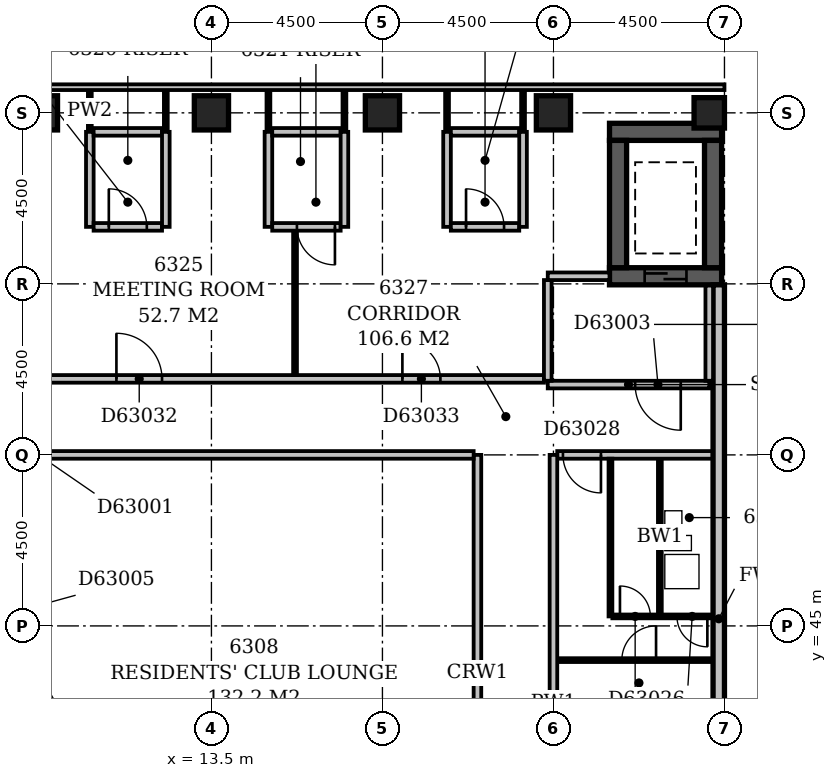
"""IFC4 building model, lengths in metres.
Left out: names, types, materials, properties, quantities, classifications, styles, units other than length and angle.
Written with IfcOpenShell. Run it as: python <this file> out.ifc"""

import sys

from ifc_helpers import new_model, si_unit, direction, frame, frame_2d, origin, origin_2d, place, context, subcontext, project, spatial, rectangle, extrude, element, fill, save


model = new_model("IFC4")
c1 = context("Model", 3, precision=1e-05, world=origin(), true_north=direction((0.0, 1.0)))
c2 = subcontext(c1, "Body", "Model", "MODEL_VIEW")
j1 = project(units=[si_unit("LENGTHUNIT", "METRE"), si_unit("PLANEANGLEUNIT", "RADIAN")], contexts=[c1])
p1 = place(None, origin())
s1 = spatial("IfcSite", under=j1, at=p1, CompositionType="ELEMENT")
p2 = place(p1, origin())
s2 = spatial("IfcBuilding", under=s1, at=p2, CompositionType="ELEMENT")
p3 = place(p2, frame((0.0, 0.0, 243.8)))
s3 = spatial("IfcBuildingStorey", under=s2, at=p3, CompositionType="ELEMENT", Elevation=243.8)
p4 = place(p3, frame((23.975, 54.2, -0.3), z_axis=(0.0, 0.0, 1.0), x_axis=(1.0, 0.0, 0.0)))
e1 = element("IfcWall", 1, at=p4, inside=s3, PredefinedType="SHEAR", context=c2, shape_type="SweptSolid", body=[
    extrude(rectangle(XDim=2.95, YDim=0.45, at=frame_2d((1.475, 0.0))), origin(), (0.0, 0.0, 1.0), 3.6),
])
p5 = place(p4, frame((0.925, 0.0, 0.3)))
e2 = element("IfcOpeningElement", 2, at=p5, cuts=e1, PredefinedType="OPENING", context=c2, shape_type="SweptSolid", body=[
    extrude(rectangle(XDim=1.1, YDim=2.1, at=frame_2d((0.55, 1.05))), frame((0.0, 0.237, 0.0), z_axis=(0.0, -1.0, 0.0), x_axis=(1.0, 0.0, 0.0)), (0.0, 0.0, 1.0), 0.474),
])
p6 = place(p3, frame((23.975, 58.0, -0.3), z_axis=(0.0, 0.0, 1.0), x_axis=(1.0, 0.0, 0.0)))
e3 = element("IfcWall", 3, at=p6, inside=s3, PredefinedType="SHEAR", context=c2, shape_type="SweptSolid", body=[
    extrude(rectangle(XDim=2.95, YDim=0.45, at=frame_2d((1.475, 0.0))), origin(), (0.0, 0.0, 1.0), 3.6),
])
for number, where, z_axis, x_axis in (
    (4, (24.2, 54.425, -0.3), (0.0, 0.0, 1.0), (0.0, 1.0, 0.0)),
    (5, (26.7, 54.425, -0.3), (0.0, 0.0, 1.0), (0.0, 1.0, 0.0)),
):
    element("IfcWall", number, at=place(p3, frame(where, z_axis=z_axis, x_axis=x_axis)), inside=s3, PredefinedType="SHEAR", context=c2, shape_type="SweptSolid", body=[
        extrude(rectangle(XDim=3.35, YDim=0.45, at=frame_2d((1.675, 0.0))), origin(), (0.0, 0.0, 1.0), 3.6),
    ])
for number, where, z_axis, x_axis in (
    (6, (9.0, 58.5, -0.3), (0.0, 0.0, 1.0), (1.0, 0.0, 0.0)),
    (7, (13.5, 58.5, -0.3), (0.0, 0.0, 1.0), (1.0, 0.0, 0.0)),
    (8, (18.0, 58.5, -0.3), (0.0, 0.0, 1.0), (1.0, 0.0, 0.0)),
    (9, (22.5, 58.5, -0.3), (0.0, 0.0, 1.0), (1.0, 0.0, 0.0)),
):
    element("IfcColumn", number, at=place(p3, frame(where, z_axis=z_axis, x_axis=x_axis)), inside=s3, PredefinedType="COLUMN", context=c2, shape_type="SweptSolid", body=[
        extrude(rectangle(XDim=0.9, YDim=0.9, at=origin_2d()), origin(), (0.0, 0.0, 1.0), 3.6),
    ])
p7 = place(p3, frame((26.6, 58.5, -0.3), z_axis=(0.0, 0.0, 1.0), x_axis=(1.0, 0.0, 0.0)))
e10 = element("IfcColumn", 10, at=p7, inside=s3, PredefinedType="COLUMN", context=c2, shape_type="SweptSolid", body=[
    extrude(rectangle(XDim=0.8, YDim=0.8, at=origin_2d()), origin(), (0.0, 0.0, 1.0), 3.6),
])
p8 = place(p3, frame((27.0, 59.175, 0.0), z_axis=(0.0, 0.0, 1.0), x_axis=(-1.0, 0.0, 0.0)))
e11 = element("IfcWall", 11, at=p8, inside=s3, PredefinedType="STANDARD", context=c2, shape_type="SweptSolid", body=[
    extrude(rectangle(XDim=27.75, YDim=0.15, at=frame_2d((13.875, 0.0))), origin(), (0.0, 0.0, 1.0), 2.7),
])
p9 = place(p3, frame((26.85, 36.4, 0.0), z_axis=(0.0, 0.0, 1.0), x_axis=(0.0, 1.0, 0.0)))
e12 = element("IfcWall", 12, at=p9, inside=s3, PredefinedType="STANDARD", context=c2, shape_type="SweptSolid", body=[
    extrude(rectangle(XDim=17.575, YDim=0.3, at=frame_2d((8.788, 0.0))), origin(), (0.0, 0.0, 1.0), 3.3),
])
p10 = place(p3, frame((22.35, 51.35, 0.0), z_axis=(0.0, 0.0, 1.0), x_axis=(1.0, 0.0, 0.0)))
e13 = element("IfcWall", 13, at=p10, inside=s3, PredefinedType="PARTITIONING", context=c2, shape_type="SweptSolid", body=[
    extrude(rectangle(XDim=4.25, YDim=0.2, at=frame_2d((2.125, 0.0))), origin(), (0.0, 0.0, 1.0), 3.3),
])
p11 = place(p10, frame((2.3, 0.0, 0.0)))
e14 = element("IfcOpeningElement", 14, at=p11, cuts=e13, PredefinedType="OPENING", context=c2, shape_type="SweptSolid", body=[
    extrude(rectangle(XDim=1.2, YDim=2.1, at=frame_2d((0.6, 1.05))), frame((0.0, 0.112, 0.0), z_axis=(0.0, -1.0, 0.0), x_axis=(1.0, 0.0, 0.0)), (0.0, 0.0, 1.0), 0.224),
])
p12 = place(p3, frame((26.6, 51.45, 0.0), z_axis=(0.0, 0.0, 1.0), x_axis=(0.0, 1.0, 0.0)))
e15 = element("IfcWall", 15, at=p12, inside=s3, PredefinedType="PARTITIONING", context=c2, shape_type="SweptSolid", body=[
    extrude(rectangle(XDim=2.505, YDim=0.2, at=frame_2d((1.252, 0.0))), origin(), (0.0, 0.0, 1.0), 3.3),
])
p13 = place(p3, frame((22.35, 54.2, 0.0), z_axis=(0.0, 0.0, 1.0), x_axis=(1.0, 0.0, 0.0)))
e16 = element("IfcWall", 16, at=p13, inside=s3, PredefinedType="PARTITIONING", context=c2, shape_type="SweptSolid", body=[
    extrude(rectangle(XDim=1.625, YDim=0.2, at=frame_2d((0.812, 0.0))), origin(), (0.0, 0.0, 1.0), 3.3),
])
p14 = place(p3, frame((22.35, 51.45, 0.0), z_axis=(0.0, 0.0, 1.0), x_axis=(0.0, 1.0, 0.0)))
e17 = element("IfcWall", 17, at=p14, inside=s3, PredefinedType="PARTITIONING", context=c2, shape_type="SweptSolid", body=[
    extrude(rectangle(XDim=2.65, YDim=0.2, at=frame_2d((1.325, 0.0))), origin(), (0.0, 0.0, 1.0), 3.3),
])
p15 = place(p3, frame((22.5, 36.45, 0.0), z_axis=(0.0, 0.0, 1.0), x_axis=(0.0, 1.0, 0.0)))
e18 = element("IfcWall", 18, at=p15, inside=s3, PredefinedType="PARTITIONING", context=c2, shape_type="SweptSolid", body=[
    extrude(rectangle(XDim=13.05, YDim=0.2, at=frame_2d((6.525, 0.0))), origin(), (0.0, 0.0, 1.0), 3.3),
])
p16 = place(p3, frame((20.5, 38.0, 0.0), z_axis=(0.0, 0.0, 1.0), x_axis=(0.0, 1.0, 0.0)))
e19 = element("IfcWall", 19, at=p16, inside=s3, PredefinedType="PARTITIONING", context=c2, shape_type="SweptSolid", body=[
    extrude(rectangle(XDim=11.5, YDim=0.2, at=frame_2d((5.75, 0.0))), origin(), (0.0, 0.0, 1.0), 3.3),
])
p17 = place(p3, frame((22.6, 44.1, 0.0), z_axis=(0.0, 0.0, 1.0), x_axis=(1.0, 0.0, 0.0)))
e20 = element("IfcWall", 20, at=p17, inside=s3, PredefinedType="PARTITIONING", context=c2, shape_type="SweptSolid", body=[
    extrude(rectangle(XDim=4.4, YDim=0.1, at=frame_2d((2.2, 0.0))), origin(), (0.0, 0.0, 1.0), 3.3),
])
p18 = place(p17, frame((1.7, 0.0, 0.0)))
e21 = element("IfcOpeningElement", 21, at=p18, cuts=e20, PredefinedType="OPENING", context=c2, shape_type="SweptSolid", body=[
    extrude(rectangle(XDim=0.9, YDim=2.1, at=frame_2d((0.45, 1.05))), frame((0.0, 0.062, 0.0), z_axis=(0.0, -1.0, 0.0), x_axis=(1.0, 0.0, 0.0)), (0.0, 0.0, 1.0), 0.124),
])
p19 = place(p3, frame((24.0, 45.25, 0.0), z_axis=(0.0, 0.0, 1.0), x_axis=(0.0, 1.0, 0.0)))
e22 = element("IfcWall", 22, at=p19, inside=s3, PredefinedType="PARTITIONING", context=c2, shape_type="SweptSolid", body=[
    extrude(rectangle(XDim=4.15, YDim=0.1, at=frame_2d((2.075, 0.0))), origin(), (0.0, 0.0, 1.0), 3.3),
])
p20 = place(p3, frame((24.05, 45.25, 0.0), z_axis=(0.0, 0.0, 1.0), x_axis=(1.0, 0.0, 0.0)))
e23 = element("IfcWall", 23, at=p20, inside=s3, PredefinedType="PARTITIONING", context=c2, shape_type="SweptSolid", body=[
    extrude(rectangle(XDim=2.95, YDim=0.1, at=frame_2d((1.475, 0.0))), origin(), (0.0, 0.0, 1.0), 3.3),
])
p21 = place(p20, frame((1.7, 0.0, 0.0)))
e24 = element("IfcOpeningElement", 24, at=p21, cuts=e23, PredefinedType="OPENING", context=c2, shape_type="SweptSolid", body=[
    extrude(rectangle(XDim=0.8, YDim=2.1, at=frame_2d((0.4, 1.05))), frame((0.0, 0.062, 0.0), z_axis=(0.0, -1.0, 0.0), x_axis=(1.0, 0.0, 0.0)), (0.0, 0.0, 1.0), 0.124),
])
p22 = place(p20, frame((0.2, 0.0, 0.0)))
e25 = element("IfcOpeningElement", 25, at=p22, cuts=e23, PredefinedType="OPENING", context=c2, shape_type="SweptSolid", body=[
    extrude(rectangle(XDim=0.8, YDim=2.1, at=frame_2d((0.4, 1.05))), frame((0.0, 0.062, 0.0), z_axis=(0.0, -1.0, 0.0), x_axis=(1.0, 0.0, 0.0)), (0.0, 0.0, 1.0), 0.124),
])
p23 = place(p3, frame((25.3, 45.3, 0.0), z_axis=(0.0, 0.0, 1.0), x_axis=(0.0, 1.0, 0.0)))
e26 = element("IfcWall", 26, at=p23, inside=s3, PredefinedType="PLUMBINGWALL", context=c2, shape_type="SweptSolid", body=[
    extrude(rectangle(XDim=4.1, YDim=0.1, at=frame_2d((2.05, 0.0))), origin(), (0.0, 0.0, 1.0), 3.3),
])
p24 = place(p3, frame((9.1, 49.5, 0.0), z_axis=(0.0, 0.0, 1.0), x_axis=(1.0, 0.0, 0.0)))
e27 = element("IfcWall", 27, at=p24, inside=s3, PredefinedType="PARTITIONING", context=c2, shape_type="SweptSolid", body=[
    extrude(rectangle(XDim=11.3, YDim=0.2, at=frame_2d((5.65, 0.0))), origin(), (0.0, 0.0, 1.0), 3.3),
])
p25 = place(p3, frame((22.6, 49.5, 0.0), z_axis=(0.0, 0.0, 1.0), x_axis=(1.0, 0.0, 0.0)))
e28 = element("IfcWall", 28, at=p25, inside=s3, PredefinedType="PARTITIONING", context=c2, shape_type="SweptSolid", body=[
    extrude(rectangle(XDim=4.4, YDim=0.2, at=frame_2d((2.2, 0.0))), origin(), (0.0, 0.0, 1.0), 3.3),
])
p26 = place(p25, frame((0.15, 0.0, 0.0)))
e29 = element("IfcOpeningElement", 29, at=p26, cuts=e28, PredefinedType="OPENING", context=c2, shape_type="SweptSolid", body=[
    extrude(rectangle(XDim=1.0, YDim=2.1, at=frame_2d((0.5, 1.05))), frame((0.0, 0.112, 0.0), z_axis=(0.0, -1.0, 0.0), x_axis=(1.0, 0.0, 0.0)), (0.0, 0.0, 1.0), 0.224),
])
p27 = place(p3, frame((7.6, 51.5, 0.0), z_axis=(0.0, 0.0, 1.0), x_axis=(1.0, 0.0, 0.0)))
e30 = element("IfcWall", 30, at=p27, inside=s3, PredefinedType="PARTITIONING", context=c2, shape_type="SweptSolid", body=[
    extrude(rectangle(XDim=14.65, YDim=0.2, at=frame_2d((7.325, 0.0))), origin(), (0.0, 0.0, 1.0), 3.3),
])
p28 = place(p27, frame((3.4, 0.0, 0.0)))
e31 = element("IfcOpeningElement", 31, at=p28, cuts=e30, PredefinedType="OPENING", context=c2, shape_type="SweptSolid", body=[
    extrude(rectangle(XDim=1.2, YDim=2.1, at=frame_2d((0.6, 1.05))), frame((0.0, 0.112, 0.0), z_axis=(0.0, -1.0, 0.0), x_axis=(1.0, 0.0, 0.0)), (0.0, 0.0, 1.0), 0.224),
])
p29 = place(p27, frame((10.925, 0.0, 0.0)))
e32 = element("IfcOpeningElement", 32, at=p29, cuts=e30, PredefinedType="OPENING", context=c2, shape_type="SweptSolid", body=[
    extrude(rectangle(XDim=1.0, YDim=2.1, at=frame_2d((0.5, 1.05))), frame((0.0, 0.112, 0.0), z_axis=(0.0, -1.0, 0.0), x_axis=(1.0, 0.0, 0.0)), (0.0, 0.0, 1.0), 0.224),
])
p30 = place(p3, frame((15.7, 51.6, 0.0), z_axis=(0.0, 0.0, 1.0), x_axis=(0.0, 1.0, 0.0)))
e33 = element("IfcWall", 33, at=p30, inside=s3, PredefinedType="PARTITIONING", context=c2, shape_type="SweptSolid", body=[
    extrude(rectangle(XDim=3.8, YDim=0.1, at=frame_2d((1.9, 0.0))), origin(), (0.0, 0.0, 1.0), 3.3),
])
p31 = place(p3, frame((10.3, 55.5, 0.0), z_axis=(0.0, 0.0, 1.0), x_axis=(0.0, 1.0, 0.0)))
e34 = element("IfcWall", 34, at=p31, inside=s3, PredefinedType="PARTITIONING", context=c2, shape_type="SweptSolid", body=[
    extrude(rectangle(XDim=2.5, YDim=0.2, at=frame_2d((1.25, 0.0))), origin(), (0.0, 0.0, 1.0), 3.3),
])
p32 = place(p3, frame((10.4, 55.5, 0.0), z_axis=(0.0, 0.0, 1.0), x_axis=(1.0, 0.0, 0.0)))
e35 = element("IfcWall", 35, at=p32, inside=s3, PredefinedType="PARTITIONING", context=c2, shape_type="SweptSolid", body=[
    extrude(rectangle(XDim=1.8, YDim=0.2, at=frame_2d((0.9, 0.0))), origin(), (0.0, 0.0, 1.0), 3.3),
])
p33 = place(p32, frame((0.4, 0.0, 0.0)))
e36 = element("IfcOpeningElement", 36, at=p33, cuts=e35, PredefinedType="OPENING", context=c2, shape_type="SweptSolid", body=[
    extrude(rectangle(XDim=1.0, YDim=2.1, at=frame_2d((0.5, 1.05))), frame((0.0, 0.112, 0.0), z_axis=(0.0, -1.0, 0.0), x_axis=(1.0, 0.0, 0.0)), (0.0, 0.0, 1.0), 0.224),
])
for number, where, z_axis, x_axis in (
    (37, (12.3, 55.5, 0.0), (0.0, 0.0, 1.0), (0.0, 1.0, 0.0)),
    (38, (15.0, 55.5, 0.0), (0.0, 0.0, 1.0), (0.0, 1.0, 0.0)),
):
    element("IfcWall", number, at=place(p3, frame(where, z_axis=z_axis, x_axis=x_axis)), inside=s3, PredefinedType="PARTITIONING", context=c2, shape_type="SweptSolid", body=[
        extrude(rectangle(XDim=2.5, YDim=0.2, at=frame_2d((1.25, 0.0))), origin(), (0.0, 0.0, 1.0), 3.3),
    ])
p34 = place(p3, frame((15.1, 55.5, 0.0), z_axis=(0.0, 0.0, 1.0), x_axis=(1.0, 0.0, 0.0)))
e39 = element("IfcWall", 39, at=p34, inside=s3, PredefinedType="PARTITIONING", context=c2, shape_type="SweptSolid", body=[
    extrude(rectangle(XDim=1.8, YDim=0.2, at=frame_2d((0.9, 0.0))), origin(), (0.0, 0.0, 1.0), 3.3),
])
p35 = place(p34, frame((0.65, 0.0, 0.0)))
e40 = element("IfcOpeningElement", 40, at=p35, cuts=e39, PredefinedType="OPENING", context=c2, shape_type="SweptSolid", body=[
    extrude(rectangle(XDim=1.0, YDim=2.1, at=frame_2d((0.5, 1.05))), frame((0.0, 0.112, 0.0), z_axis=(0.0, -1.0, 0.0), x_axis=(1.0, 0.0, 0.0)), (0.0, 0.0, 1.0), 0.224),
])
for number, where, z_axis, x_axis in (
    (41, (17.0, 55.5, 0.0), (0.0, 0.0, 1.0), (0.0, 1.0, 0.0)),
    (42, (19.7, 55.5, 0.0), (0.0, 0.0, 1.0), (0.0, 1.0, 0.0)),
):
    element("IfcWall", number, at=place(p3, frame(where, z_axis=z_axis, x_axis=x_axis)), inside=s3, PredefinedType="PARTITIONING", context=c2, shape_type="SweptSolid", body=[
        extrude(rectangle(XDim=2.5, YDim=0.2, at=frame_2d((1.25, 0.0))), origin(), (0.0, 0.0, 1.0), 3.3),
    ])
p36 = place(p3, frame((19.8, 55.5, 0.0), z_axis=(0.0, 0.0, 1.0), x_axis=(1.0, 0.0, 0.0)))
e43 = element("IfcWall", 43, at=p36, inside=s3, PredefinedType="PARTITIONING", context=c2, shape_type="SweptSolid", body=[
    extrude(rectangle(XDim=1.8, YDim=0.2, at=frame_2d((0.9, 0.0))), origin(), (0.0, 0.0, 1.0), 3.3),
])
p37 = place(p36, frame((0.4, 0.0, 0.0)))
e44 = element("IfcOpeningElement", 44, at=p37, cuts=e43, PredefinedType="OPENING", context=c2, shape_type="SweptSolid", body=[
    extrude(rectangle(XDim=1.0, YDim=2.1, at=frame_2d((0.5, 1.05))), frame((0.0, 0.112, 0.0), z_axis=(0.0, -1.0, 0.0), x_axis=(1.0, 0.0, 0.0)), (0.0, 0.0, 1.0), 0.224),
])
p38 = place(p3, frame((21.7, 55.5, 0.0), z_axis=(0.0, 0.0, 1.0), x_axis=(0.0, 1.0, 0.0)))
e45 = element("IfcWall", 45, at=p38, inside=s3, PredefinedType="PARTITIONING", context=c2, shape_type="SweptSolid", body=[
    extrude(rectangle(XDim=2.5, YDim=0.2, at=frame_2d((1.25, 0.0))), origin(), (0.0, 0.0, 1.0), 3.3),
])
p39 = place(p3, frame((10.3, 58.0, 0.0), z_axis=(0.0, 0.0, 1.0), x_axis=(0.0, 1.0, 0.0)))
e46 = element("IfcWall", 46, at=p39, inside=s3, PredefinedType="PARTITIONING", context=c2, shape_type="SweptSolid", body=[
    extrude(rectangle(XDim=1.1, YDim=0.1, at=frame_2d((0.55, 0.0))), origin(), (0.0, 0.0, 1.0), 3.3),
])
p40 = place(p3, frame((10.4, 58.0, 0.0), z_axis=(0.0, 0.0, 1.0), x_axis=(1.0, 0.0, 0.0)))
e47 = element("IfcWall", 47, at=p40, inside=s3, PredefinedType="PARTITIONING", context=c2, shape_type="SweptSolid", body=[
    extrude(rectangle(XDim=1.8, YDim=0.2, at=frame_2d((0.9, 0.0))), origin(), (0.0, 0.0, 1.0), 3.3),
])
for number, where, z_axis, x_axis in (
    (48, (12.3, 58.0, 0.0), (0.0, 0.0, 1.0), (0.0, 1.0, 0.0)),
    (49, (15.0, 58.0, 0.0), (0.0, 0.0, 1.0), (0.0, 1.0, 0.0)),
):
    element("IfcWall", number, at=place(p3, frame(where, z_axis=z_axis, x_axis=x_axis)), inside=s3, PredefinedType="PARTITIONING", context=c2, shape_type="SweptSolid", body=[
        extrude(rectangle(XDim=1.1, YDim=0.1, at=frame_2d((0.55, 0.0))), origin(), (0.0, 0.0, 1.0), 3.3),
    ])
p41 = place(p3, frame((15.1, 58.0, 0.0), z_axis=(0.0, 0.0, 1.0), x_axis=(1.0, 0.0, 0.0)))
e50 = element("IfcWall", 50, at=p41, inside=s3, PredefinedType="PARTITIONING", context=c2, shape_type="SweptSolid", body=[
    extrude(rectangle(XDim=1.8, YDim=0.2, at=frame_2d((0.9, 0.0))), origin(), (0.0, 0.0, 1.0), 3.3),
])
for number, where, z_axis, x_axis in (
    (51, (17.0, 58.0, 0.0), (0.0, 0.0, 1.0), (0.0, 1.0, 0.0)),
    (52, (19.7, 58.0, 0.0), (0.0, 0.0, 1.0), (0.0, 1.0, 0.0)),
):
    element("IfcWall", number, at=place(p3, frame(where, z_axis=z_axis, x_axis=x_axis)), inside=s3, PredefinedType="PARTITIONING", context=c2, shape_type="SweptSolid", body=[
        extrude(rectangle(XDim=1.1, YDim=0.1, at=frame_2d((0.55, 0.0))), origin(), (0.0, 0.0, 1.0), 3.3),
    ])
p42 = place(p3, frame((19.8, 58.0, 0.0), z_axis=(0.0, 0.0, 1.0), x_axis=(1.0, 0.0, 0.0)))
e53 = element("IfcWall", 53, at=p42, inside=s3, PredefinedType="PARTITIONING", context=c2, shape_type="SweptSolid", body=[
    extrude(rectangle(XDim=1.8, YDim=0.2, at=frame_2d((0.9, 0.0))), origin(), (0.0, 0.0, 1.0), 3.3),
])
p43 = place(p3, frame((21.7, 58.0, 0.0), z_axis=(0.0, 0.0, 1.0), x_axis=(0.0, 1.0, 0.0)))
e54 = element("IfcWall", 54, at=p43, inside=s3, PredefinedType="PARTITIONING", context=c2, shape_type="SweptSolid", body=[
    extrude(rectangle(XDim=1.1, YDim=0.1, at=frame_2d((0.55, 0.0))), origin(), (0.0, 0.0, 1.0), 3.3),
])
p44 = place(p11, origin())
e55 = element("IfcDoor", 55, at=p44, inside=s3, OperationType="SINGLE_SWING_RIGHT", PredefinedType="DOOR", context=c2, shape_type="SweptSolid", body=[
    extrude(rectangle(XDim=1.2, YDim=2.1, at=frame_2d((0.6, 1.05))), frame((0.0, 0.025, 0.0), z_axis=(0.0, -1.0, 0.0), x_axis=(1.0, 0.0, 0.0)), (0.0, 0.0, 1.0), 0.05),
])
fill(e14, e55)
p45 = place(p5, origin())
e56 = element("IfcDoor", 56, at=p45, inside=s3, OperationType="SLIDING_TO_LEFT", PredefinedType="DOOR", context=c2, shape_type="SweptSolid", body=[
    extrude(rectangle(XDim=1.1, YDim=2.1, at=frame_2d((0.55, 1.05))), frame((0.0, 0.025, 0.0), z_axis=(0.0, -1.0, 0.0), x_axis=(1.0, 0.0, 0.0)), (0.0, 0.0, 1.0), 0.05),
])
fill(e2, e56)
p46 = place(p18, frame((0.9, 0.0, 0.0), z_axis=(0.0, 0.0, 1.0), x_axis=(-1.0, 0.0, 0.0)))
e57 = element("IfcDoor", 57, at=p46, inside=s3, OperationType="SINGLE_SWING_LEFT", PredefinedType="DOOR", context=c2, shape_type="SweptSolid", body=[
    extrude(rectangle(XDim=0.9, YDim=2.1, at=frame_2d((0.45, 1.05))), frame((0.0, 0.025, 0.0), z_axis=(0.0, -1.0, 0.0), x_axis=(1.0, 0.0, 0.0)), (0.0, 0.0, 1.0), 0.05),
])
fill(e21, e57)
p47 = place(p21, origin())
e58 = element("IfcDoor", 58, at=p47, inside=s3, OperationType="SINGLE_SWING_RIGHT", PredefinedType="DOOR", context=c2, shape_type="SweptSolid", body=[
    extrude(rectangle(XDim=0.8, YDim=2.1, at=frame_2d((0.4, 1.05))), frame((0.0, 0.025, 0.0), z_axis=(0.0, -1.0, 0.0), x_axis=(1.0, 0.0, 0.0)), (0.0, 0.0, 1.0), 0.05),
])
fill(e24, e58)
p48 = place(p22, origin())
e59 = element("IfcDoor", 59, at=p48, inside=s3, OperationType="SINGLE_SWING_LEFT", PredefinedType="DOOR", context=c2, shape_type="SweptSolid", body=[
    extrude(rectangle(XDim=0.8, YDim=2.1, at=frame_2d((0.4, 1.05))), frame((0.0, 0.025, 0.0), z_axis=(0.0, -1.0, 0.0), x_axis=(1.0, 0.0, 0.0)), (0.0, 0.0, 1.0), 0.05),
])
fill(e25, e59)
p49 = place(p26, origin())
e60 = element("IfcDoor", 60, at=p49, inside=s3, OperationType="SINGLE_SWING_RIGHT", PredefinedType="DOOR", context=c2, shape_type="SweptSolid", body=[
    extrude(rectangle(XDim=1.0, YDim=2.1, at=frame_2d((0.5, 1.05))), frame((0.0, 0.025, 0.0), z_axis=(0.0, -1.0, 0.0), x_axis=(1.0, 0.0, 0.0)), (0.0, 0.0, 1.0), 0.05),
])
fill(e29, e60)
p50 = place(p28, origin())
e61 = element("IfcDoor", 61, at=p50, inside=s3, OperationType="SINGLE_SWING_LEFT", PredefinedType="DOOR", context=c2, shape_type="SweptSolid", body=[
    extrude(rectangle(XDim=1.2, YDim=2.1, at=frame_2d((0.6, 1.05))), frame((0.0, 0.025, 0.0), z_axis=(0.0, -1.0, 0.0), x_axis=(1.0, 0.0, 0.0)), (0.0, 0.0, 1.0), 0.05),
])
fill(e31, e61)
p51 = place(p29, origin())
e62 = element("IfcDoor", 62, at=p51, inside=s3, OperationType="SINGLE_SWING_LEFT", PredefinedType="DOOR", context=c2, shape_type="SweptSolid", body=[
    extrude(rectangle(XDim=1.0, YDim=2.1, at=frame_2d((0.5, 1.05))), frame((0.0, 0.025, 0.0), z_axis=(0.0, -1.0, 0.0), x_axis=(1.0, 0.0, 0.0)), (0.0, 0.0, 1.0), 0.05),
])
fill(e32, e62)
p52 = place(p33, origin())
e63 = element("IfcDoor", 63, at=p52, inside=s3, OperationType="SINGLE_SWING_LEFT", PredefinedType="DOOR", context=c2, shape_type="SweptSolid", body=[
    extrude(rectangle(XDim=1.0, YDim=2.1, at=frame_2d((0.5, 1.05))), frame((0.0, 0.025, 0.0), z_axis=(0.0, -1.0, 0.0), x_axis=(1.0, 0.0, 0.0)), (0.0, 0.0, 1.0), 0.05),
])
fill(e36, e63)
p53 = place(p35, origin())
e64 = element("IfcDoor", 64, at=p53, inside=s3, OperationType="SINGLE_SWING_RIGHT", PredefinedType="DOOR", context=c2, shape_type="SweptSolid", body=[
    extrude(rectangle(XDim=1.0, YDim=2.1, at=frame_2d((0.5, 1.05))), frame((0.0, 0.025, 0.0), z_axis=(0.0, -1.0, 0.0), x_axis=(1.0, 0.0, 0.0)), (0.0, 0.0, 1.0), 0.05),
])
fill(e40, e64)
p54 = place(p37, origin())
e65 = element("IfcDoor", 65, at=p54, inside=s3, OperationType="SINGLE_SWING_LEFT", PredefinedType="DOOR", context=c2, shape_type="SweptSolid", body=[
    extrude(rectangle(XDim=1.0, YDim=2.1, at=frame_2d((0.5, 1.05))), frame((0.0, 0.025, 0.0), z_axis=(0.0, -1.0, 0.0), x_axis=(1.0, 0.0, 0.0)), (0.0, 0.0, 1.0), 0.05),
])
fill(e44, e65)
save(model, sys.argv[1])
